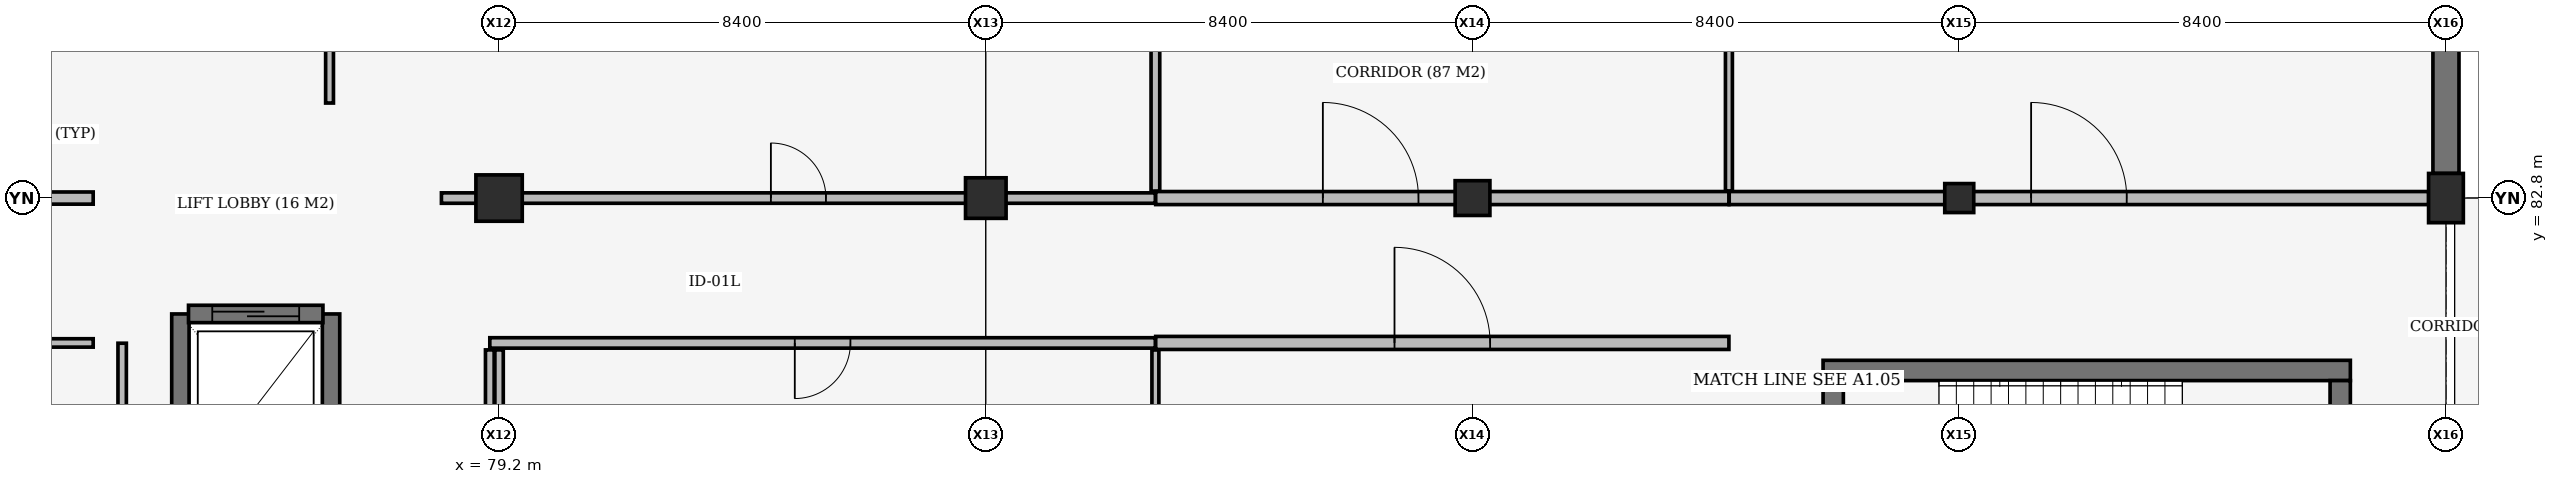
"""IFC4 building model, lengths in metres.
Left out: names, types, materials, properties, quantities, classifications, styles, units other than length and angle.
Written with IfcOpenShell. Run it as: python <this file> out.ifc"""

import sys

from ifc_helpers import new_model, si_unit, direction, frame, frame_2d, origin, origin_2d, place, context, subcontext, project, spatial, rectangle, extrude, element, fill, save


model = new_model("IFC4")
c1 = context("Model", 3, precision=1e-05, world=origin(), true_north=direction((0.0, 1.0)))
c2 = subcontext(c1, "Body", "Model", "MODEL_VIEW")
j1 = project(units=[si_unit("LENGTHUNIT", "METRE"), si_unit("PLANEANGLEUNIT", "RADIAN")], contexts=[c1])
p1 = place(None, origin())
s1 = spatial("IfcSite", under=j1, at=p1, CompositionType="ELEMENT")
p2 = place(p1, origin())
s2 = spatial("IfcBuilding", under=s1, at=p2, CompositionType="ELEMENT")
p3 = place(p2, frame((0.0, 0.0, -4.5)))
s3 = spatial("IfcBuildingStorey", under=s2, at=p3, CompositionType="ELEMENT", Elevation=-4.5)
p4 = place(p3, frame((79.2, 82.8, -0.46), z_axis=(0.0, 0.0, 1.0), x_axis=(1.0, 0.0, 0.0)))
e1 = element("IfcColumn", 1, at=p4, inside=s3, PredefinedType="COLUMN", context=c2, shape_type="SweptSolid", body=[
    extrude(rectangle(XDim=0.8, YDim=0.8, at=origin_2d()), origin(), (0.0, 0.0, 1.0), 4.61),
])
p5 = place(p3, frame((87.6, 82.8, -0.46), z_axis=(0.0, 0.0, 1.0), x_axis=(1.0, 0.0, 0.0)))
e2 = element("IfcColumn", 2, at=p5, inside=s3, PredefinedType="COLUMN", context=c2, shape_type="SweptSolid", body=[
    extrude(rectangle(XDim=0.7, YDim=0.7, at=origin_2d()), origin(), (0.0, 0.0, 1.0), 4.61),
])
p6 = place(p3, frame((96.0, 82.8, -0.46), z_axis=(0.0, 0.0, 1.0), x_axis=(1.0, 0.0, 0.0)))
e3 = element("IfcColumn", 3, at=p6, inside=s3, PredefinedType="COLUMN", context=c2, shape_type="SweptSolid", body=[
    extrude(rectangle(XDim=0.6, YDim=0.6, at=origin_2d()), origin(), (0.0, 0.0, 1.0), 4.61),
])
p7 = place(p3, frame((104.4, 82.8, -0.46), z_axis=(0.0, 0.0, 1.0), x_axis=(1.0, 0.0, 0.0)))
e4 = element("IfcColumn", 4, at=p7, inside=s3, PredefinedType="COLUMN", context=c2, shape_type="SweptSolid", body=[
    extrude(rectangle(XDim=0.5, YDim=0.5, at=origin_2d()), origin(), (0.0, 0.0, 1.0), 4.61),
])
p8 = place(p3, frame((112.8, 82.8, -0.46), z_axis=(0.0, 0.0, 1.0), x_axis=(1.0, 0.0, 0.0)))
e5 = element("IfcColumn", 5, at=p8, inside=s3, PredefinedType="COLUMN", context=c2, shape_type="SweptSolid", body=[
    extrude(rectangle(XDim=0.6, YDim=0.85, at=origin_2d()), origin(), (0.0, 0.0, 1.0), 4.61),
])
p9 = place(p3, frame((111.15, 79.825, 0.0), z_axis=(0.0, 0.0, 1.0), x_axis=(-1.0, 0.0, 0.0)))
e6 = element("IfcWall", 6, at=p9, inside=s3, PredefinedType="SHEAR", context=c2, shape_type="SweptSolid", body=[
    extrude(rectangle(XDim=9.1, YDim=0.35, at=frame_2d((4.55, 0.0))), origin(), (0.0, 0.0, 1.0), 4.15),
])
p10 = place(p3, frame((110.975, 76.2, 0.0), z_axis=(0.0, 0.0, 1.0), x_axis=(0.0, 1.0, 0.0)))
e7 = element("IfcWall", 7, at=p10, inside=s3, PredefinedType="SHEAR", context=c2, shape_type="SweptSolid", body=[
    extrude(rectangle(XDim=3.45, YDim=0.35, at=frame_2d((1.725, 0.0))), origin(), (0.0, 0.0, 1.0), 4.15),
])
for number, where, z_axis, x_axis in (
    (8, (73.7, 80.8, 0.0), (0.0, 0.0, 1.0), (0.0, -1.0, 0.0)),
    (9, (76.3, 77.6, 0.0), (0.0, 0.0, 1.0), (0.0, 1.0, 0.0)),
):
    element("IfcWall", number, at=place(p3, frame(where, z_axis=z_axis, x_axis=x_axis)), inside=s3, PredefinedType="SHEAR", context=c2, shape_type="SweptSolid", body=[
        extrude(rectangle(XDim=3.2, YDim=0.3, at=frame_2d((1.6, 0.0))), origin(), (0.0, 0.0, 1.0), 4.15),
    ])
p11 = place(p3, frame((112.8, 83.225, 0.0), z_axis=(0.0, 0.0, 1.0), x_axis=(0.0, 1.0, 0.0)))
e10 = element("IfcWall", 10, at=p11, inside=s3, PredefinedType="USERDEFINED", context=c2, shape_type="SweptSolid", body=[
    extrude(rectangle(XDim=2.95, YDim=0.45, at=frame_2d((1.475, 0.0))), origin(), (0.0, 0.0, 1.0), 4.15),
])
p12 = place(p3, frame((102.225, 79.65, 0.0), z_axis=(0.0, 0.0, 1.0), x_axis=(0.0, -1.0, 0.0)))
e11 = element("IfcWall", 11, at=p12, inside=s3, PredefinedType="SHEAR", context=c2, shape_type="SweptSolid", body=[
    extrude(rectangle(XDim=3.45, YDim=0.35, at=frame_2d((1.725, 0.0))), origin(), (0.0, 0.0, 1.0), 4.15),
])
p13 = place(p12, frame((1.035, 0.0, 0.0)))
e12 = element("IfcOpeningElement", 12, at=p13, cuts=e11, PredefinedType="OPENING", context=c2, shape_type="SweptSolid", body=[
    extrude(rectangle(XDim=1.38, YDim=2.2, at=frame_2d((0.69, 1.1))), frame((0.0, 0.185, 0.0), z_axis=(0.0, -1.0, 0.0), x_axis=(1.0, 0.0, 0.0)), (0.0, 0.0, 1.0), 0.37),
])
p14 = place(p3, frame((73.84, 80.8, 0.0), z_axis=(0.0, 0.0, 1.0), x_axis=(1.0, 0.0, 0.0)))
e13 = element("IfcWall", 13, at=p14, inside=s3, PredefinedType="SHEAR", context=c2, shape_type="SweptSolid", body=[
    extrude(rectangle(XDim=2.32, YDim=0.3, at=frame_2d((1.16, 0.0))), origin(), (0.0, 0.0, 1.0), 4.15),
])
p15 = place(p14, frame((0.41, 0.0, 0.0)))
e14 = element("IfcOpeningElement", 14, at=p15, cuts=e13, PredefinedType="OPENING", context=c2, shape_type="SweptSolid", body=[
    extrude(rectangle(XDim=1.5, YDim=2.2, at=frame_2d((0.75, 1.1))), frame((0.0, 0.16, 0.0), z_axis=(0.0, -1.0, 0.0), x_axis=(1.0, 0.0, 0.0)), (0.0, 0.0, 1.0), 0.32),
])
p16 = place(p3, frame((69.2, 80.3, 0.0), z_axis=(0.0, 0.0, 1.0), x_axis=(1.0, 0.0, 0.0)))
e15 = element("IfcWall", 15, at=p16, inside=s3, PredefinedType="PLUMBINGWALL", context=c2, shape_type="SweptSolid", body=[
    extrude(rectangle(XDim=2.995, YDim=0.145, at=frame_2d((1.498, 0.0))), origin(), (0.0, 0.0, 1.0), 3.55),
])
p17 = place(p16, frame((1.048, 0.0, 0.0)))
e16 = element("IfcOpeningElement", 16, at=p17, cuts=e15, PredefinedType="OPENING", context=c2, shape_type="SweptSolid", body=[
    extrude(rectangle(XDim=0.9, YDim=2.1, at=frame_2d((0.45, 1.05))), frame((0.0, 0.083, 0.0), z_axis=(0.0, -1.0, 0.0), x_axis=(1.0, 0.0, 0.0)), (0.0, 0.0, 1.0), 0.165),
])
p18 = place(p3, frame((79.2, 76.4, 0.0), z_axis=(0.0, 0.0, 1.0), x_axis=(0.0, 1.0, 0.0)))
e17 = element("IfcWall", 17, at=p18, inside=s3, PredefinedType="PLUMBINGWALL", context=c2, shape_type="SweptSolid", body=[
    extrude(rectangle(XDim=3.78, YDim=0.145, at=frame_2d((1.89, 0.0))), origin(), (0.0, 0.0, 1.0), 3.45),
])
p19 = place(p3, frame((79.04, 80.3, 0.0), z_axis=(0.0, 0.0, 1.0), x_axis=(1.0, 0.0, 0.0)))
e18 = element("IfcWall", 18, at=p19, inside=s3, PredefinedType="PARTITIONING", context=c2, shape_type="SweptSolid", body=[
    extrude(rectangle(XDim=11.487, YDim=0.18, at=frame_2d((5.744, 0.0))), origin(), (0.0, 0.0, 1.0), 3.35),
])
p20 = place(p19, frame((5.263, 0.0, 0.0)))
e19 = element("IfcOpeningElement", 19, at=p20, cuts=e18, PredefinedType="OPENING", context=c2, shape_type="SweptSolid", body=[
    extrude(rectangle(XDim=0.96, YDim=2.15, at=frame_2d((0.48, 1.075))), frame((0.0, 0.1, 0.0), z_axis=(0.0, -1.0, 0.0), x_axis=(1.0, 0.0, 0.0)), (0.0, 0.0, 1.0), 0.2),
])
p21 = place(p3, frame((79.04, 75.85, 0.0), z_axis=(0.0, 0.0, 1.0), x_axis=(0.0, 1.0, 0.0)))
e20 = element("IfcWall", 20, at=p21, inside=s3, PredefinedType="PARTITIONING", context=c2, shape_type="SweptSolid", body=[
    extrude(rectangle(XDim=4.33, YDim=0.15, at=frame_2d((2.165, 0.0))), origin(), (0.0, 0.0, 1.0), 3.45),
])
p22 = place(p3, frame((90.527, 75.85, 0.0), z_axis=(0.0, 0.0, 1.0), x_axis=(0.0, 1.0, 0.0)))
e21 = element("IfcWall", 21, at=p22, inside=s3, PredefinedType="PARTITIONING", context=c2, shape_type="SweptSolid", body=[
    extrude(rectangle(XDim=4.33, YDim=0.12, at=frame_2d((2.165, 0.0))), origin(), (0.0, 0.0, 1.0), 3.95),
])
p23 = place(p3, frame((90.532, 80.3, 0.0), z_axis=(0.0, 0.0, 1.0), x_axis=(1.0, 0.0, 0.0)))
e22 = element("IfcWall", 22, at=p23, inside=s3, PredefinedType="STANDARD", context=c2, shape_type="SweptSolid", body=[
    extrude(rectangle(XDim=9.893, YDim=0.225, at=frame_2d((4.947, 0.0))), origin(), (0.0, 0.0, 1.0), 3.5),
])
p24 = place(p23, frame((4.122, 0.0, 0.0)))
e23 = element("IfcOpeningElement", 23, at=p24, cuts=e22, PredefinedType="OPENING", context=c2, shape_type="SweptSolid", body=[
    extrude(rectangle(XDim=1.65, YDim=2.25, at=frame_2d((0.825, 1.125))), frame((0.0, 0.123, 0.0), z_axis=(0.0, -1.0, 0.0), x_axis=(1.0, 0.0, 0.0)), (0.0, 0.0, 1.0), 0.245),
])
p25 = place(p3, frame((64.203, 82.8, 0.0), z_axis=(0.0, 0.0, 1.0), x_axis=(1.0, 0.0, 0.0)))
e24 = element("IfcWall", 24, at=p25, inside=s3, PredefinedType="STANDARD", context=c2, shape_type="SweptSolid", body=[
    extrude(rectangle(XDim=7.992, YDim=0.21, at=frame_2d((3.996, 0.0))), origin(), (0.0, 0.0, 1.0), 3.35),
])
p26 = place(p25, frame((3.046, 0.0, 0.0)))
e25 = element("IfcOpeningElement", 25, at=p26, cuts=e24, PredefinedType="OPENING", context=c2, shape_type="SweptSolid", body=[
    extrude(rectangle(XDim=1.9, YDim=2.35, at=frame_2d((0.95, 1.175))), frame((0.0, 0.115, 0.0), z_axis=(0.0, -1.0, 0.0), x_axis=(1.0, 0.0, 0.0)), (0.0, 0.0, 1.0), 0.23),
])
p27 = place(p3, frame((76.274, 84.44, 0.0), z_axis=(0.0, 0.0, 1.0), x_axis=(0.0, 1.0, 0.0)))
e26 = element("IfcWall", 26, at=p27, inside=s3, PredefinedType="PARTITIONING", context=c2, shape_type="SweptSolid", body=[
    extrude(rectangle(XDim=34.11, YDim=0.135, at=frame_2d((17.055, 0.0))), origin(), (0.0, 0.0, 1.0), 3.35),
])
p28 = place(p3, frame((78.205, 82.8, 0.0), z_axis=(0.0, 0.0, 1.0), x_axis=(1.0, 0.0, 0.0)))
e27 = element("IfcWall", 27, at=p28, inside=s3, PredefinedType="PARTITIONING", context=c2, shape_type="SweptSolid", body=[
    extrude(rectangle(XDim=12.322, YDim=0.18, at=frame_2d((6.161, 0.0))), origin(), (0.0, 0.0, 1.0), 3.35),
])
p29 = place(p28, frame((5.686, 0.0, 0.0)))
e28 = element("IfcOpeningElement", 28, at=p29, cuts=e27, PredefinedType="OPENING", context=c2, shape_type="SweptSolid", body=[
    extrude(rectangle(XDim=0.95, YDim=2.15, at=frame_2d((0.475, 1.075))), frame((0.0, 0.1, 0.0), z_axis=(0.0, -1.0, 0.0), x_axis=(1.0, 0.0, 0.0)), (0.0, 0.0, 1.0), 0.2),
])
p30 = place(p3, frame((90.527, 82.92, 0.0), z_axis=(0.0, 0.0, 1.0), x_axis=(0.0, 1.0, 0.0)))
e29 = element("IfcWall", 29, at=p30, inside=s3, PredefinedType="PARTITIONING", context=c2, shape_type="SweptSolid", body=[
    extrude(rectangle(XDim=35.63, YDim=0.15, at=frame_2d((17.815, 0.0))), origin(), (0.0, 0.0, 1.0), 3.35),
])
p31 = place(p3, frame((90.532, 82.8, 0.0), z_axis=(0.0, 0.0, 1.0), x_axis=(1.0, 0.0, 0.0)))
e30 = element("IfcWall", 30, at=p31, inside=s3, PredefinedType="STANDARD", context=c2, shape_type="SweptSolid", body=[
    extrude(rectangle(XDim=9.893, YDim=0.225, at=frame_2d((4.947, 0.0))), origin(), (0.0, 0.0, 1.0), 3.4),
])
p32 = place(p31, frame((2.885, 0.0, 0.0)))
e31 = element("IfcOpeningElement", 31, at=p32, cuts=e30, PredefinedType="OPENING", context=c2, shape_type="SweptSolid", body=[
    extrude(rectangle(XDim=1.65, YDim=2.25, at=frame_2d((0.825, 1.125))), frame((0.0, 0.123, 0.0), z_axis=(0.0, -1.0, 0.0), x_axis=(1.0, 0.0, 0.0)), (0.0, 0.0, 1.0), 0.245),
])
p33 = place(p3, frame((100.425, 82.923, 0.0), z_axis=(0.0, 0.0, 1.0), x_axis=(0.0, 1.0, 0.0)))
e32 = element("IfcWall", 32, at=p33, inside=s3, PredefinedType="PARTITIONING", context=c2, shape_type="SweptSolid", body=[
    extrude(rectangle(XDim=35.627, YDim=0.12, at=frame_2d((17.814, 0.0))), origin(), (0.0, 0.0, 1.0), 3.35),
])
p34 = place(p3, frame((100.43, 82.8, 0.0), z_axis=(0.0, 0.0, 1.0), x_axis=(1.0, 0.0, 0.0)))
e33 = element("IfcWall", 33, at=p34, inside=s3, PredefinedType="STANDARD", context=c2, shape_type="SweptSolid", body=[
    extrude(rectangle(XDim=12.071, YDim=0.225, at=frame_2d((6.036, 0.0))), origin(), (0.0, 0.0, 1.0), 3.35),
])
p35 = place(p34, frame((5.21, 0.0, 0.0)))
e34 = element("IfcOpeningElement", 34, at=p35, cuts=e33, PredefinedType="OPENING", context=c2, shape_type="SweptSolid", body=[
    extrude(rectangle(XDim=1.65, YDim=2.25, at=frame_2d((0.825, 1.125))), frame((0.0, 0.123, 0.0), z_axis=(0.0, -1.0, 0.0), x_axis=(1.0, 0.0, 0.0)), (0.0, 0.0, 1.0), 0.245),
])
p36 = place(p3, frame((72.695, 76.405, 0.0), z_axis=(0.0, 0.0, 1.0), x_axis=(0.0, 1.0, 0.0)))
e35 = element("IfcWall", 35, at=p36, inside=s3, PredefinedType="PLUMBINGWALL", context=c2, shape_type="SweptSolid", body=[
    extrude(rectangle(XDim=3.89, YDim=0.145, at=frame_2d((1.945, 0.0))), origin(), (0.0, 0.0, 1.0), 4.15),
])
p37 = place(p15, origin())
e36 = element("IfcDoor", 36, at=p37, inside=s3, OperationType="SLIDING_TO_LEFT", PredefinedType="DOOR", context=c2, shape_type="SweptSolid", body=[
    extrude(rectangle(XDim=1.5, YDim=2.2, at=frame_2d((0.75, 1.1))), frame((0.0, 0.025, 0.0), z_axis=(0.0, -1.0, 0.0), x_axis=(1.0, 0.0, 0.0)), (0.0, 0.0, 1.0), 0.05),
])
fill(e14, e36)
p38 = place(p20, origin())
e37 = element("IfcDoor", 37, at=p38, inside=s3, OperationType="SINGLE_SWING_RIGHT", PredefinedType="DOOR", context=c2, shape_type="SweptSolid", body=[
    extrude(rectangle(XDim=0.96, YDim=2.15, at=frame_2d((0.48, 1.075))), frame((0.0, 0.025, 0.0), z_axis=(0.0, -1.0, 0.0), x_axis=(1.0, 0.0, 0.0)), (0.0, 0.0, 1.0), 0.05),
])
fill(e19, e37)
p39 = place(p24, origin())
e38 = element("IfcDoor", 38, at=p39, inside=s3, OperationType="DOUBLE_DOOR_SINGLE_SWING", PredefinedType="DOOR", context=c2, shape_type="SweptSolid", body=[
    extrude(rectangle(XDim=1.65, YDim=2.25, at=frame_2d((0.825, 1.125))), frame((0.0, 0.025, 0.0), z_axis=(0.0, -1.0, 0.0), x_axis=(1.0, 0.0, 0.0)), (0.0, 0.0, 1.0), 0.05),
])
fill(e23, e38)
p40 = place(p29, origin())
e39 = element("IfcDoor", 39, at=p40, inside=s3, OperationType="SINGLE_SWING_LEFT", PredefinedType="DOOR", context=c2, shape_type="SweptSolid", body=[
    extrude(rectangle(XDim=0.95, YDim=2.15, at=frame_2d((0.475, 1.075))), frame((0.0, 0.025, 0.0), z_axis=(0.0, -1.0, 0.0), x_axis=(1.0, 0.0, 0.0)), (0.0, 0.0, 1.0), 0.05),
])
fill(e28, e39)
p41 = place(p32, origin())
e40 = element("IfcDoor", 40, at=p41, inside=s3, OperationType="DOUBLE_DOOR_SINGLE_SWING", PredefinedType="DOOR", context=c2, shape_type="SweptSolid", body=[
    extrude(rectangle(XDim=1.65, YDim=2.25, at=frame_2d((0.825, 1.125))), frame((0.0, 0.025, 0.0), z_axis=(0.0, -1.0, 0.0), x_axis=(1.0, 0.0, 0.0)), (0.0, 0.0, 1.0), 0.05),
])
fill(e31, e40)
p42 = place(p35, origin())
e41 = element("IfcDoor", 41, at=p42, inside=s3, OperationType="DOUBLE_DOOR_SINGLE_SWING", PredefinedType="DOOR", context=c2, shape_type="SweptSolid", body=[
    extrude(rectangle(XDim=1.65, YDim=2.25, at=frame_2d((0.825, 1.125))), frame((0.0, 0.025, 0.0), z_axis=(0.0, -1.0, 0.0), x_axis=(1.0, 0.0, 0.0)), (0.0, 0.0, 1.0), 0.05),
])
fill(e34, e41)
save(model, sys.argv[1])
